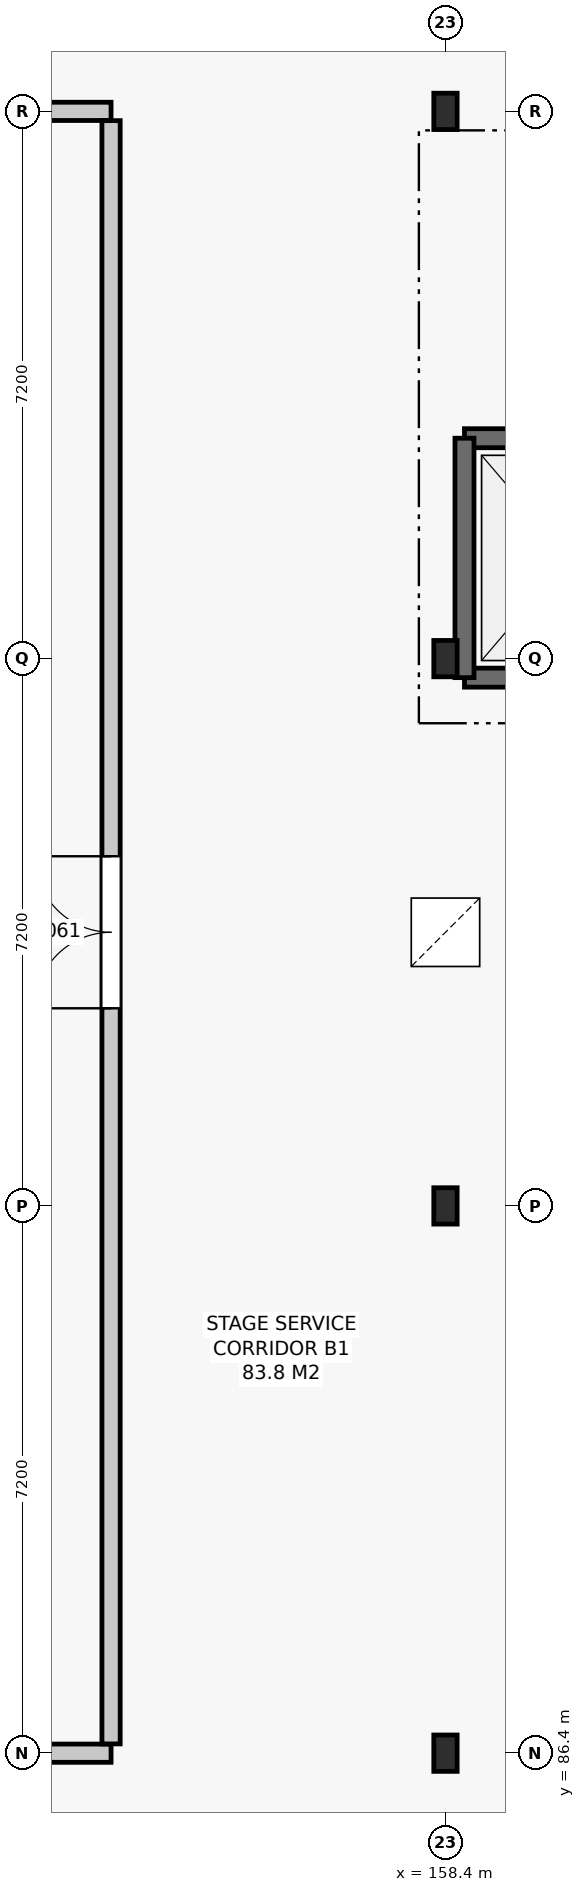
"""IFC4 building model, lengths in metres.
Left out: names, types, materials, properties, quantities, classifications, styles, units other than length and angle.
Written with IfcOpenShell. Run it as: python <this file> out.ifc"""

import sys

from ifc_helpers import new_model, si_unit, direction, frame, frame_2d, origin, origin_2d, place, context, subcontext, project, spatial, rectangle, i_section, extrude, element, fill, save


model = new_model("IFC4")
c1 = context("Model", 3, precision=1e-05, world=origin(), true_north=direction((0.0, 1.0)))
c2 = subcontext(c1, "Body", "Model", "MODEL_VIEW")
j1 = project(units=[si_unit("LENGTHUNIT", "METRE"), si_unit("PLANEANGLEUNIT", "RADIAN")], contexts=[c1])
p1 = place(None, origin())
s1 = spatial("IfcSite", under=j1, at=p1, CompositionType="ELEMENT")
p2 = place(p1, origin())
s2 = spatial("IfcBuilding", under=s1, at=p2, CompositionType="ELEMENT")
p3 = place(p2, frame((0.0, 0.0, -4.2)))
s3 = spatial("IfcBuildingStorey", under=s2, at=p3, CompositionType="ELEMENT", Elevation=-4.2)
for number, where, z_axis, x_axis in (
    (1, (158.4, 86.4, 0.0), (0.0, 0.0, 1.0), (1.0, 0.0, 0.0)),
    (2, (158.4, 93.6, 0.0), (0.0, 0.0, 1.0), (1.0, 0.0, 0.0)),
    (3, (158.4, 100.8, 0.0), (0.0, 0.0, 1.0), (1.0, 0.0, 0.0)),
    (4, (158.4, 108.0, 0.0), (0.0, 0.0, 1.0), (1.0, 0.0, 0.0)),
):
    element("IfcColumn", number, at=place(p3, frame(where, z_axis=z_axis, x_axis=x_axis)), inside=s3, PredefinedType="COLUMN", context=c2, shape_type="SweptSolid", body=[
        extrude(i_section(OverallWidth=0.307, OverallDepth=0.478, WebThickness=0.021, FlangeThickness=0.04, FilletRadius=0.027, at=origin_2d()), origin(), (0.0, 0.0, 1.0), 4.2),
    ])
p4 = place(p3, frame((158.65, 100.55, 0.0), z_axis=(0.0, 0.0, 1.0), x_axis=(1.0, 0.0, 0.0)))
e5 = element("IfcWall", 5, at=p4, inside=s3, PredefinedType="SHEAR", context=c2, shape_type="SweptSolid", body=[
    extrude(rectangle(XDim=2.75, YDim=0.25, at=frame_2d((1.375, 0.0))), origin(), (0.0, 0.0, 1.0), 3.88),
])
p5 = place(p3, frame((161.4, 103.7, 0.0), z_axis=(0.0, 0.0, 1.0), x_axis=(-1.0, 0.0, 0.0)))
e6 = element("IfcWall", 6, at=p5, inside=s3, PredefinedType="SHEAR", context=c2, shape_type="SweptSolid", body=[
    extrude(rectangle(XDim=2.75, YDim=0.25, at=frame_2d((1.375, 0.0))), origin(), (0.0, 0.0, 1.0), 3.88),
])
p6 = place(p5, frame((0.675, 0.0, 0.0)))
e7 = element("IfcOpeningElement", 7, at=p6, cuts=e6, PredefinedType="OPENING", context=c2, shape_type="SweptSolid", body=[
    extrude(rectangle(XDim=1.4, YDim=2.2, at=frame_2d((0.7, 1.1))), frame((0.0, 0.137, 0.0), z_axis=(0.0, -1.0, 0.0), x_axis=(1.0, 0.0, 0.0)), (0.0, 0.0, 1.0), 0.274),
])
p7 = place(p3, frame((158.65, 103.7, 0.0), z_axis=(0.0, 0.0, 1.0), x_axis=(0.0, -1.0, 0.0)))
e8 = element("IfcWall", 8, at=p7, inside=s3, PredefinedType="SHEAR", context=c2, shape_type="SweptSolid", body=[
    extrude(rectangle(XDim=3.15, YDim=0.25, at=frame_2d((1.575, 0.0))), origin(), (0.0, 0.0, 1.0), 3.88),
])
for number, where, z_axis, x_axis in (
    (9, (151.357, 86.4, 0.0), (0.0, 0.0, 1.0), (1.0, 0.0, 0.0)),
    (10, (151.357, 108.0, 0.0), (0.0, 0.0, 1.0), (1.0, 0.0, 0.0)),
):
    element("IfcWall", number, at=place(p3, frame(where, z_axis=z_axis, x_axis=x_axis)), inside=s3, PredefinedType="SOLIDWALL", context=c2, shape_type="SweptSolid", body=[
        extrude(rectangle(XDim=2.643, YDim=0.24, at=frame_2d((1.321, 0.0))), origin(), (0.0, 0.0, 1.0), 3.375),
    ])
p8 = place(p3, frame((154.0, 86.522, 0.0), z_axis=(0.0, 0.0, 1.0), x_axis=(0.0, 1.0, 0.0)))
e11 = element("IfcWall", 11, at=p8, inside=s3, PredefinedType="SOLIDWALL", context=c2, shape_type="SweptSolid", body=[
    extrude(rectangle(XDim=21.356, YDim=0.24, at=frame_2d((10.678, 0.0))), origin(), (0.0, 0.0, 1.0), 3.375),
])
p9 = place(p8, frame((9.678, 0.0, 0.0)))
e12 = element("IfcOpeningElement", 12, at=p9, cuts=e11, PredefinedType="OPENING", context=c2, shape_type="SweptSolid", body=[
    extrude(rectangle(XDim=2.0, YDim=2.4, at=frame_2d((1.0, 1.2))), frame((0.0, 0.132, 0.0), z_axis=(0.0, -1.0, 0.0), x_axis=(1.0, 0.0, 0.0)), (0.0, 0.0, 1.0), 0.264),
])
p10 = place(p9, origin())
e13 = element("IfcDoor", 13, at=p10, inside=s3, OperationType="DOUBLE_DOOR_SINGLE_SWING", PredefinedType="DOOR", context=c2, shape_type="SweptSolid", body=[
    extrude(rectangle(XDim=2.0, YDim=2.4, at=frame_2d((1.0, 1.2))), frame((0.0, 0.025, 0.0), z_axis=(0.0, -1.0, 0.0), x_axis=(1.0, 0.0, 0.0)), (0.0, 0.0, 1.0), 0.05),
])
fill(e12, e13)
save(model, sys.argv[1])
